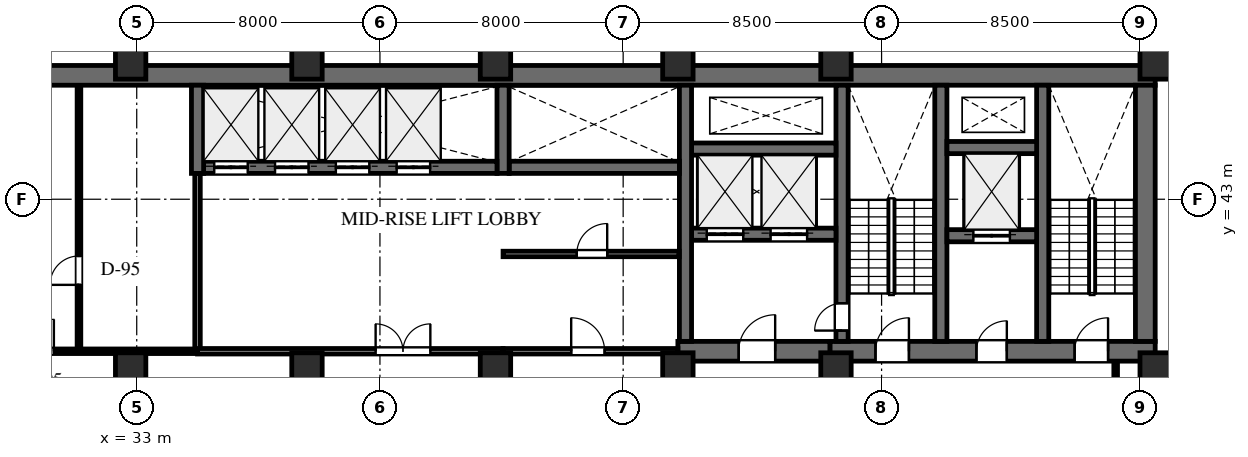
"""IFC4 building model, lengths in metres.
Left out: names, types, materials, properties, quantities, classifications, styles, units other than length and angle.
Written with IfcOpenShell. Run it as: python <this file> out.ifc"""

import sys

from ifc_helpers import new_model, si_unit, direction, frame, frame_2d, origin, origin_2d, place, context, subcontext, project, spatial, rectangle, extrude, element, fill, save


model = new_model("IFC4")
c1 = context("Model", 3, precision=1e-05, world=origin(), true_north=direction((0.0, 1.0)))
c2 = subcontext(c1, "Body", "Model", "MODEL_VIEW")
j1 = project(units=[si_unit("LENGTHUNIT", "METRE"), si_unit("PLANEANGLEUNIT", "RADIAN")], contexts=[c1])
p1 = place(None, origin())
s1 = spatial("IfcSite", under=j1, at=p1, CompositionType="ELEMENT")
p2 = place(p1, origin())
s2 = spatial("IfcBuilding", under=s1, at=p2, CompositionType="ELEMENT")
p3 = place(p2, frame((0.0, 0.0, 104.0)))
s3 = spatial("IfcBuildingStorey", under=s2, at=p3, CompositionType="ELEMENT", Elevation=104.0)
p4 = place(p3, frame((22.9, 47.075, 0.0), z_axis=(0.0, 0.0, 1.0), x_axis=(1.0, 0.0, 0.0)))
e1 = element("IfcWall", 1, at=p4, inside=s3, PredefinedType="SHEAR", context=c2, shape_type="SweptSolid", body=[
    extrude(rectangle(XDim=43.6, YDim=0.65, at=frame_2d((21.8, 0.0))), origin(), (0.0, 0.0, 1.0), 4.0),
])
p5 = place(p3, frame((55.8, 38.0, 0.0), z_axis=(0.0, 0.0, 1.0), x_axis=(1.0, 0.0, 0.0)))
e2 = element("IfcWall", 2, at=p5, inside=s3, PredefinedType="SHEAR", context=c2, shape_type="SweptSolid", body=[
    extrude(rectangle(XDim=10.7, YDim=0.65, at=frame_2d((5.35, 0.0))), origin(), (0.0, 0.0, 1.0), 4.0),
])
p6 = place(p5, frame((1.5, 0.0, 0.0)))
e3 = element("IfcOpeningElement", 3, at=p6, cuts=e2, PredefinedType="OPENING", context=c2, shape_type="SweptSolid", body=[
    extrude(rectangle(XDim=1.1, YDim=2.2, at=frame_2d((0.55, 1.1))), frame((0.0, 0.335, 0.0), z_axis=(0.0, -1.0, 0.0), x_axis=(1.0, 0.0, 0.0)), (0.0, 0.0, 1.0), 0.67),
])
p7 = place(p5, frame((4.82, 0.0, 0.0)))
e4 = element("IfcOpeningElement", 4, at=p7, cuts=e2, PredefinedType="OPENING", context=c2, shape_type="SweptSolid", body=[
    extrude(rectangle(XDim=1.0, YDim=2.15, at=frame_2d((0.5, 1.075))), frame((0.0, 0.335, 0.0), z_axis=(0.0, -1.0, 0.0), x_axis=(1.0, 0.0, 0.0)), (0.0, 0.0, 1.0), 0.67),
])
p8 = place(p5, frame((8.05, 0.0, 0.0)))
e5 = element("IfcOpeningElement", 5, at=p8, cuts=e2, PredefinedType="OPENING", context=c2, shape_type="SweptSolid", body=[
    extrude(rectangle(XDim=1.1, YDim=2.2, at=frame_2d((0.55, 1.1))), frame((0.0, 0.335, 0.0), z_axis=(0.0, -1.0, 0.0), x_axis=(1.0, 0.0, 0.0)), (0.0, 0.0, 1.0), 0.67),
])
p9 = place(p3, frame((66.175, 38.325, 0.0), z_axis=(0.0, 0.0, 1.0), x_axis=(0.0, 1.0, 0.0)))
e6 = element("IfcWall", 6, at=p9, inside=s3, PredefinedType="SHEAR", context=c2, shape_type="SweptSolid", body=[
    extrude(rectangle(XDim=8.425, YDim=0.65, at=frame_2d((4.212, 0.0))), origin(), (0.0, 0.0, 1.0), 4.0),
])
for number, where, z_axis, x_axis in (
    (7, (62.8, 38.325, 0.0), (0.0, 0.0, 1.0), (0.0, 1.0, 0.0)),
    (8, (59.45, 38.325, 0.0), (0.0, 0.0, 1.0), (0.0, 1.0, 0.0)),
):
    element("IfcWall", number, at=place(p3, frame(where, z_axis=z_axis, x_axis=x_axis)), inside=s3, PredefinedType="SHEAR", context=c2, shape_type="SweptSolid", body=[
        extrude(rectangle(XDim=8.425, YDim=0.4, at=frame_2d((4.212, 0.0))), origin(), (0.0, 0.0, 1.0), 4.0),
    ])
p10 = place(p3, frame((56.2, 38.325, 0.0), z_axis=(0.0, 0.0, 1.0), x_axis=(0.0, 1.0, 0.0)))
e9 = element("IfcWall", 9, at=p10, inside=s3, PredefinedType="SHEAR", context=c2, shape_type="SweptSolid", body=[
    extrude(rectangle(XDim=8.425, YDim=0.4, at=frame_2d((4.212, 0.0))), origin(), (0.0, 0.0, 1.0), 4.0),
])
p11 = place(p10, frame((0.355, 0.0, 0.0)))
e10 = element("IfcOpeningElement", 10, at=p11, cuts=e9, PredefinedType="OPENING", context=c2, shape_type="SweptSolid", body=[
    extrude(rectangle(XDim=0.9, YDim=2.15, at=frame_2d((0.45, 1.075))), frame((0.0, 0.21, 0.0), z_axis=(0.0, -1.0, 0.0), x_axis=(1.0, 0.0, 0.0)), (0.0, 0.0, 1.0), 0.42),
])
p12 = place(p3, frame((59.65, 41.8, 0.0), z_axis=(0.0, 0.0, 1.0), x_axis=(1.0, 0.0, 0.0)))
e11 = element("IfcWall", 11, at=p12, inside=s3, PredefinedType="SHEAR", context=c2, shape_type="SweptSolid", body=[
    extrude(rectangle(XDim=2.95, YDim=0.4, at=frame_2d((1.475, 0.0))), origin(), (0.0, 0.0, 1.0), 4.0),
])
p13 = place(p12, frame((0.87, 0.0, 0.0)))
e12 = element("IfcOpeningElement", 12, at=p13, cuts=e11, PredefinedType="OPENING", context=c2, shape_type="SweptSolid", body=[
    extrude(rectangle(XDim=1.2, YDim=2.2, at=frame_2d((0.6, 1.1))), frame((0.0, 0.21, 0.0), z_axis=(0.0, -1.0, 0.0), x_axis=(1.0, 0.0, 0.0)), (0.0, 0.0, 1.0), 0.42),
])
p14 = place(p3, frame((59.65, 44.7, 0.0), z_axis=(0.0, 0.0, 1.0), x_axis=(1.0, 0.0, 0.0)))
e13 = element("IfcWall", 13, at=p14, inside=s3, PredefinedType="SHEAR", context=c2, shape_type="SweptSolid", body=[
    extrude(rectangle(XDim=2.95, YDim=0.4, at=frame_2d((1.475, 0.0))), origin(), (0.0, 0.0, 1.0), 4.0),
])
p15 = place(p3, frame((50.8, 38.0, 0.0), z_axis=(0.0, 0.0, 1.0), x_axis=(1.0, 0.0, 0.0)))
e14 = element("IfcWall", 14, at=p15, inside=s3, PredefinedType="SHEAR", context=c2, shape_type="SweptSolid", body=[
    extrude(rectangle(XDim=5.0, YDim=0.65, at=frame_2d((2.5, 0.0))), origin(), (0.0, 0.0, 1.0), 4.0),
])
p16 = place(p15, frame((2.0, 0.0, 0.0)))
e15 = element("IfcOpeningElement", 15, at=p16, cuts=e14, PredefinedType="OPENING", context=c2, shape_type="SweptSolid", body=[
    extrude(rectangle(XDim=1.2, YDim=2.2, at=frame_2d((0.6, 1.1))), frame((0.0, 0.335, 0.0), z_axis=(0.0, -1.0, 0.0), x_axis=(1.0, 0.0, 0.0)), (0.0, 0.0, 1.0), 0.67),
])
p17 = place(p3, frame((51.25, 41.85, 0.0), z_axis=(0.0, 0.0, 1.0), x_axis=(1.0, 0.0, 0.0)))
e16 = element("IfcWall", 16, at=p17, inside=s3, PredefinedType="SHEAR", context=c2, shape_type="SweptSolid", body=[
    extrude(rectangle(XDim=4.75, YDim=0.4, at=frame_2d((2.375, 0.0))), origin(), (0.0, 0.0, 1.0), 4.0),
])
p18 = place(p17, frame((0.5, 0.0, 0.0)))
e17 = element("IfcOpeningElement", 17, at=p18, cuts=e16, PredefinedType="OPENING", context=c2, shape_type="SweptSolid", body=[
    extrude(rectangle(XDim=1.2, YDim=2.2, at=frame_2d((0.6, 1.1))), frame((0.0, 0.21, 0.0), z_axis=(0.0, -1.0, 0.0), x_axis=(1.0, 0.0, 0.0)), (0.0, 0.0, 1.0), 0.42),
])
p19 = place(p17, frame((2.6, 0.0, 0.0)))
e18 = element("IfcOpeningElement", 18, at=p19, cuts=e16, PredefinedType="OPENING", context=c2, shape_type="SweptSolid", body=[
    extrude(rectangle(XDim=1.2, YDim=2.2, at=frame_2d((0.6, 1.1))), frame((0.0, 0.21, 0.0), z_axis=(0.0, -1.0, 0.0), x_axis=(1.0, 0.0, 0.0)), (0.0, 0.0, 1.0), 0.42),
])
p20 = place(p3, frame((51.25, 44.65, 0.0), z_axis=(0.0, 0.0, 1.0), x_axis=(1.0, 0.0, 0.0)))
e19 = element("IfcWall", 19, at=p20, inside=s3, PredefinedType="SHEAR", context=c2, shape_type="SweptSolid", body=[
    extrude(rectangle(XDim=4.75, YDim=0.4, at=frame_2d((2.375, 0.0))), origin(), (0.0, 0.0, 1.0), 4.0),
])
p21 = place(p3, frame((51.05, 38.325, 0.0), z_axis=(0.0, 0.0, 1.0), x_axis=(0.0, 1.0, 0.0)))
e20 = element("IfcWall", 20, at=p21, inside=s3, PredefinedType="SHEAR", context=c2, shape_type="SweptSolid", body=[
    extrude(rectangle(XDim=8.425, YDim=0.4, at=frame_2d((4.212, 0.0))), origin(), (0.0, 0.0, 1.0), 4.0),
])
p22 = place(p3, frame((45.25, 44.05, 0.0), z_axis=(0.0, 0.0, 1.0), x_axis=(1.0, 0.0, 0.0)))
e21 = element("IfcWall", 21, at=p22, inside=s3, PredefinedType="SHEAR", context=c2, shape_type="SweptSolid", body=[
    extrude(rectangle(XDim=5.6, YDim=0.4, at=frame_2d((2.8, 0.0))), origin(), (0.0, 0.0, 1.0), 4.0),
])
p23 = place(p3, frame((45.05, 43.85, 0.0), z_axis=(0.0, 0.0, 1.0), x_axis=(0.0, 1.0, 0.0)))
e22 = element("IfcWall", 22, at=p23, inside=s3, PredefinedType="SHEAR", context=c2, shape_type="SweptSolid", body=[
    extrude(rectangle(XDim=2.9, YDim=0.4, at=frame_2d((1.45, 0.0))), origin(), (0.0, 0.0, 1.0), 4.0),
])
p24 = place(p3, frame((35.2, 44.05, 0.0), z_axis=(0.0, 0.0, 1.0), x_axis=(1.0, 0.0, 0.0)))
e23 = element("IfcWall", 23, at=p24, inside=s3, PredefinedType="SHEAR", context=c2, shape_type="SweptSolid", body=[
    extrude(rectangle(XDim=9.65, YDim=0.4, at=frame_2d((4.825, 0.0))), origin(), (0.0, 0.0, 1.0), 4.0),
])
p25 = place(p24, frame((0.35, 0.0, 0.0)))
e24 = element("IfcOpeningElement", 24, at=p25, cuts=e23, PredefinedType="OPENING", context=c2, shape_type="SweptSolid", body=[
    extrude(rectangle(XDim=1.1, YDim=2.2, at=frame_2d((0.55, 1.1))), frame((0.0, 0.21, 0.0), z_axis=(0.0, -1.0, 0.0), x_axis=(1.0, 0.0, 0.0)), (0.0, 0.0, 1.0), 0.42),
])
p26 = place(p24, frame((2.35, 0.0, 0.0)))
e25 = element("IfcOpeningElement", 25, at=p26, cuts=e23, PredefinedType="OPENING", context=c2, shape_type="SweptSolid", body=[
    extrude(rectangle(XDim=1.1, YDim=2.2, at=frame_2d((0.55, 1.1))), frame((0.0, 0.21, 0.0), z_axis=(0.0, -1.0, 0.0), x_axis=(1.0, 0.0, 0.0)), (0.0, 0.0, 1.0), 0.42),
])
p27 = place(p24, frame((4.35, 0.0, 0.0)))
e26 = element("IfcOpeningElement", 26, at=p27, cuts=e23, PredefinedType="OPENING", context=c2, shape_type="SweptSolid", body=[
    extrude(rectangle(XDim=1.1, YDim=2.2, at=frame_2d((0.55, 1.1))), frame((0.0, 0.21, 0.0), z_axis=(0.0, -1.0, 0.0), x_axis=(1.0, 0.0, 0.0)), (0.0, 0.0, 1.0), 0.42),
])
p28 = place(p24, frame((6.35, 0.0, 0.0)))
e27 = element("IfcOpeningElement", 27, at=p28, cuts=e23, PredefinedType="OPENING", context=c2, shape_type="SweptSolid", body=[
    extrude(rectangle(XDim=1.1, YDim=2.2, at=frame_2d((0.55, 1.1))), frame((0.0, 0.21, 0.0), z_axis=(0.0, -1.0, 0.0), x_axis=(1.0, 0.0, 0.0)), (0.0, 0.0, 1.0), 0.42),
])
p29 = place(p3, frame((35.0, 43.85, 0.0), z_axis=(0.0, 0.0, 1.0), x_axis=(0.0, 1.0, 0.0)))
e28 = element("IfcWall", 28, at=p29, inside=s3, PredefinedType="SHEAR", context=c2, shape_type="SweptSolid", body=[
    extrude(rectangle(XDim=2.9, YDim=0.4, at=frame_2d((1.45, 0.0))), origin(), (0.0, 0.0, 1.0), 4.0),
])
for number, where, z_axis, x_axis in (
    (29, (66.5, 47.55, 0.0), (0.0, 0.0, 1.0), (1.0, 0.0, 0.0)),
    (30, (56.0, 47.55, 0.0), (0.0, 0.0, 1.0), (1.0, 0.0, 0.0)),
    (31, (66.5, 37.35, 0.0), (0.0, 0.0, 1.0), (1.0, 0.0, 0.0)),
    (32, (56.0, 37.35, 0.0), (0.0, 0.0, 1.0), (1.0, 0.0, 0.0)),
    (33, (50.8, 47.55, 0.0), (0.0, 0.0, 1.0), (1.0, 0.0, 0.0)),
    (34, (50.8, 37.35, 0.0), (0.0, 0.0, 1.0), (1.0, 0.0, 0.0)),
    (35, (44.8, 37.35, 0.0), (0.0, 0.0, 1.0), (1.0, 0.0, 0.0)),
    (36, (44.8, 47.55, 0.0), (0.0, 0.0, 1.0), (1.0, 0.0, 0.0)),
    (37, (38.6, 37.35, 0.0), (0.0, 0.0, 1.0), (1.0, 0.0, 0.0)),
    (38, (38.6, 47.55, 0.0), (0.0, 0.0, 1.0), (1.0, 0.0, 0.0)),
    (39, (32.8, 37.35, 0.0), (0.0, 0.0, 1.0), (1.0, 0.0, 0.0)),
    (40, (32.8, 47.55, 0.0), (0.0, 0.0, 1.0), (1.0, 0.0, 0.0)),
):
    element("IfcColumn", number, at=place(p3, frame(where, z_axis=z_axis, x_axis=x_axis)), inside=s3, PredefinedType="COLUMN", context=c2, shape_type="SweptSolid", body=[
        extrude(rectangle(XDim=1.0, YDim=1.2, at=origin_2d()), origin(), (0.0, 0.0, 1.0), 4.0),
    ])
p30 = place(p3, frame((68.375, 37.8, 0.0), z_axis=(0.0, 0.0, 1.0), x_axis=(-0.13917001236, -0.990268502811, 0.0)))
e41 = element("IfcWall", 41, at=p30, inside=s3, PredefinedType="STANDARD", context=c2, shape_type="SweptSolid", body=[
    extrude(rectangle(XDim=29.549, YDim=0.28, at=frame_2d((14.774, 0.0))), origin(), (0.0, 0.0, 1.0), 3.75),
])
p31 = place(p30, frame((7.581, 0.0, 0.0)))
e42 = element("IfcOpeningElement", 42, at=p31, cuts=e41, PredefinedType="OPENING", context=c2, shape_type="SweptSolid", body=[
    extrude(rectangle(XDim=1.0, YDim=2.15, at=frame_2d((0.5, 1.075))), frame((0.0, 0.15, 0.0), z_axis=(0.0, -1.0, 0.0), x_axis=(1.0, 0.0, 0.0)), (0.0, 0.0, 1.0), 0.3),
])
p32 = place(p30, frame((3.611, 0.0, 0.65)))
e43 = element("IfcOpeningElement", 43, at=p32, cuts=e41, PredefinedType="OPENING", context=c2, shape_type="SweptSolid", body=[
    extrude(rectangle(XDim=1.8, YDim=2.1, at=frame_2d((0.9, 1.05))), frame((0.0, 0.15, 0.0), z_axis=(0.0, -1.0, 0.0), x_axis=(1.0, 0.0, 0.0)), (0.0, 0.0, 1.0), 0.3),
])
p33 = place(p30, frame((17.896, 0.0, 0.65)))
e44 = element("IfcOpeningElement", 44, at=p33, cuts=e41, PredefinedType="OPENING", context=c2, shape_type="SweptSolid", body=[
    extrude(rectangle(XDim=1.8, YDim=2.1, at=frame_2d((0.9, 1.05))), frame((0.0, 0.15, 0.0), z_axis=(0.0, -1.0, 0.0), x_axis=(1.0, 0.0, 0.0)), (0.0, 0.0, 1.0), 0.3),
])
p34 = place(p3, frame((45.05, 38.0, 0.0), z_axis=(0.0, 0.0, 1.0), x_axis=(1.0, 0.0, 0.0)))
e45 = element("IfcWall", 45, at=p34, inside=s3, PredefinedType="STANDARD", context=c2, shape_type="SweptSolid", body=[
    extrude(rectangle(XDim=5.75, YDim=0.18, at=frame_2d((2.875, 0.0))), origin(), (0.0, 0.0, 1.0), 2.894),
])
p35 = place(p34, frame((2.24, 0.0, 0.0)))
e46 = element("IfcOpeningElement", 46, at=p35, cuts=e45, PredefinedType="OPENING", context=c2, shape_type="SweptSolid", body=[
    extrude(rectangle(XDim=1.1, YDim=2.2, at=frame_2d((0.55, 1.1))), frame((0.0, 0.1, 0.0), z_axis=(0.0, -1.0, 0.0), x_axis=(1.0, 0.0, 0.0)), (0.0, 0.0, 1.0), 0.2),
])
p36 = place(p3, frame((45.05, 41.2, 0.0), z_axis=(0.0, 0.0, 1.0), x_axis=(1.0, 0.0, 0.0)))
e47 = element("IfcWall", 47, at=p36, inside=s3, PredefinedType="STANDARD", context=c2, shape_type="SweptSolid", body=[
    extrude(rectangle(XDim=5.792, YDim=0.18, at=frame_2d((2.896, 0.0))), origin(), (0.0, 0.0, 1.0), 2.894),
])
p37 = place(p36, frame((2.425, 0.0, 0.0)))
e48 = element("IfcOpeningElement", 48, at=p37, cuts=e47, PredefinedType="OPENING", context=c2, shape_type="SweptSolid", body=[
    extrude(rectangle(XDim=1.0, YDim=2.15, at=frame_2d((0.5, 1.075))), frame((0.0, 0.1, 0.0), z_axis=(0.0, -1.0, 0.0), x_axis=(1.0, 0.0, 0.0)), (0.0, 0.0, 1.0), 0.2),
])
p38 = place(p3, frame((27.05, 38.0, 0.0), z_axis=(0.0, 0.0, 1.0), x_axis=(1.0, 0.0, 0.0)))
e49 = element("IfcWall", 49, at=p38, inside=s3, PredefinedType="PARTITIONING", context=c2, shape_type="SweptSolid", body=[
    extrude(rectangle(XDim=7.95, YDim=0.15, at=frame_2d((3.975, 0.0))), origin(), (0.0, 0.0, 1.0), 2.894),
])
p39 = place(p38, frame((2.175, 0.0, 0.0)))
e50 = element("IfcOpeningElement", 50, at=p39, cuts=e49, PredefinedType="OPENING", context=c2, shape_type="SweptSolid", body=[
    extrude(rectangle(XDim=1.05, YDim=2.2, at=frame_2d((0.525, 1.1))), frame((0.0, 0.085, 0.0), z_axis=(0.0, -1.0, 0.0), x_axis=(1.0, 0.0, 0.0)), (0.0, 0.0, 1.0), 0.17),
])
p40 = place(p3, frame((35.0, 38.0, 0.0), z_axis=(0.0, 0.0, 1.0), x_axis=(0.0, 1.0, 0.0)))
e51 = element("IfcWall", 51, at=p40, inside=s3, PredefinedType="STANDARD", context=c2, shape_type="SweptSolid", body=[
    extrude(rectangle(XDim=5.85, YDim=0.18, at=frame_2d((2.925, 0.0))), origin(), (0.0, 0.0, 1.0), 3.75),
])
p41 = place(p3, frame((31.1, 38.068, 0.0), z_axis=(0.0, 0.0, 1.0), x_axis=(0.0, 1.0, 0.0)))
e52 = element("IfcWall", 52, at=p41, inside=s3, PredefinedType="PARTITIONING", context=c2, shape_type="SweptSolid", body=[
    extrude(rectangle(XDim=8.674, YDim=0.12, at=frame_2d((4.337, 0.0))), origin(), (0.0, 0.0, 1.0), 3.75),
])
p42 = place(p41, frame((2.116, 0.0, 0.0)))
e53 = element("IfcOpeningElement", 53, at=p42, cuts=e52, PredefinedType="OPENING", context=c2, shape_type="SweptSolid", body=[
    extrude(rectangle(XDim=0.95, YDim=2.15, at=frame_2d((0.475, 1.075))), frame((0.0, 0.07, 0.0), z_axis=(0.0, -1.0, 0.0), x_axis=(1.0, 0.0, 0.0)), (0.0, 0.0, 1.0), 0.14),
])
p43 = place(p3, frame((35.0, 38.0, 0.0), z_axis=(0.0, 0.0, 1.0), x_axis=(1.0, 0.0, 0.0)))
e54 = element("IfcWall", 54, at=p43, inside=s3, PredefinedType="STANDARD", context=c2, shape_type="SweptSolid", body=[
    extrude(rectangle(XDim=10.05, YDim=0.18, at=frame_2d((5.025, 0.0))), origin(), (0.0, 0.0, 1.0), 2.894),
])
p44 = place(p43, frame((5.858, 0.0, 0.0)))
e55 = element("IfcOpeningElement", 55, at=p44, cuts=e54, PredefinedType="OPENING", context=c2, shape_type="SweptSolid", body=[
    extrude(rectangle(XDim=1.8, YDim=2.2, at=frame_2d((0.9, 1.1))), frame((0.0, 0.1, 0.0), z_axis=(0.0, -1.0, 0.0), x_axis=(1.0, 0.0, 0.0)), (0.0, 0.0, 1.0), 0.2),
])
p45 = place(p3, frame((65.2, 34.4, 0.0), z_axis=(0.0, 0.0, 1.0), x_axis=(0.0, 1.0, 0.0)))
e56 = element("IfcWall", 56, at=p45, inside=s3, PredefinedType="PARTITIONING", context=c2, shape_type="SweptSolid", body=[
    extrude(rectangle(XDim=3.267, YDim=0.12, at=frame_2d((1.634, 0.0))), origin(), (0.0, 0.0, 1.0), 2.894),
])
p46 = place(p6, origin())
e57 = element("IfcDoor", 57, at=p46, inside=s3, OperationType="SINGLE_SWING_RIGHT", PredefinedType="DOOR", context=c2, shape_type="SweptSolid", body=[
    extrude(rectangle(XDim=1.1, YDim=2.2, at=frame_2d((0.55, 1.1))), frame((0.0, 0.025, 0.0), z_axis=(0.0, -1.0, 0.0), x_axis=(1.0, 0.0, 0.0)), (0.0, 0.0, 1.0), 0.05),
])
fill(e3, e57)
p47 = place(p7, origin())
e58 = element("IfcDoor", 58, at=p47, inside=s3, OperationType="SINGLE_SWING_RIGHT", PredefinedType="DOOR", context=c2, shape_type="SweptSolid", body=[
    extrude(rectangle(XDim=1.0, YDim=2.15, at=frame_2d((0.5, 1.075))), frame((0.0, 0.025, 0.0), z_axis=(0.0, -1.0, 0.0), x_axis=(1.0, 0.0, 0.0)), (0.0, 0.0, 1.0), 0.05),
])
fill(e4, e58)
p48 = place(p8, origin())
e59 = element("IfcDoor", 59, at=p48, inside=s3, OperationType="SINGLE_SWING_RIGHT", PredefinedType="DOOR", context=c2, shape_type="SweptSolid", body=[
    extrude(rectangle(XDim=1.1, YDim=2.2, at=frame_2d((0.55, 1.1))), frame((0.0, 0.025, 0.0), z_axis=(0.0, -1.0, 0.0), x_axis=(1.0, 0.0, 0.0)), (0.0, 0.0, 1.0), 0.05),
])
fill(e5, e59)
p49 = place(p16, origin())
e60 = element("IfcDoor", 60, at=p49, inside=s3, OperationType="SINGLE_SWING_RIGHT", PredefinedType="DOOR", context=c2, shape_type="SweptSolid", body=[
    extrude(rectangle(XDim=1.2, YDim=2.2, at=frame_2d((0.6, 1.1))), frame((0.0, 0.025, 0.0), z_axis=(0.0, -1.0, 0.0), x_axis=(1.0, 0.0, 0.0)), (0.0, 0.0, 1.0), 0.05),
])
fill(e15, e60)
p50 = place(p11, origin())
e61 = element("IfcDoor", 61, at=p50, inside=s3, OperationType="SINGLE_SWING_LEFT", PredefinedType="DOOR", context=c2, shape_type="SweptSolid", body=[
    extrude(rectangle(XDim=0.9, YDim=2.15, at=frame_2d((0.45, 1.075))), frame((0.0, 0.025, 0.0), z_axis=(0.0, -1.0, 0.0), x_axis=(1.0, 0.0, 0.0)), (0.0, 0.0, 1.0), 0.05),
])
fill(e10, e61)
p51 = place(p25, origin())
e62 = element("IfcDoor", 62, at=p51, inside=s3, OperationType="DOUBLE_DOOR_SLIDING", PredefinedType="DOOR", context=c2, shape_type="SweptSolid", body=[
    extrude(rectangle(XDim=1.1, YDim=2.2, at=frame_2d((0.55, 1.1))), frame((0.0, 0.025, 0.0), z_axis=(0.0, -1.0, 0.0), x_axis=(1.0, 0.0, 0.0)), (0.0, 0.0, 1.0), 0.05),
])
fill(e24, e62)
p52 = place(p26, origin())
e63 = element("IfcDoor", 63, at=p52, inside=s3, OperationType="DOUBLE_DOOR_SLIDING", PredefinedType="DOOR", context=c2, shape_type="SweptSolid", body=[
    extrude(rectangle(XDim=1.1, YDim=2.2, at=frame_2d((0.55, 1.1))), frame((0.0, 0.025, 0.0), z_axis=(0.0, -1.0, 0.0), x_axis=(1.0, 0.0, 0.0)), (0.0, 0.0, 1.0), 0.05),
])
fill(e25, e63)
p53 = place(p27, origin())
e64 = element("IfcDoor", 64, at=p53, inside=s3, OperationType="DOUBLE_DOOR_SLIDING", PredefinedType="DOOR", context=c2, shape_type="SweptSolid", body=[
    extrude(rectangle(XDim=1.1, YDim=2.2, at=frame_2d((0.55, 1.1))), frame((0.0, 0.025, 0.0), z_axis=(0.0, -1.0, 0.0), x_axis=(1.0, 0.0, 0.0)), (0.0, 0.0, 1.0), 0.05),
])
fill(e26, e64)
p54 = place(p28, origin())
e65 = element("IfcDoor", 65, at=p54, inside=s3, OperationType="DOUBLE_DOOR_SLIDING", PredefinedType="DOOR", context=c2, shape_type="SweptSolid", body=[
    extrude(rectangle(XDim=1.1, YDim=2.2, at=frame_2d((0.55, 1.1))), frame((0.0, 0.025, 0.0), z_axis=(0.0, -1.0, 0.0), x_axis=(1.0, 0.0, 0.0)), (0.0, 0.0, 1.0), 0.05),
])
fill(e27, e65)
p55 = place(p18, origin())
e66 = element("IfcDoor", 66, at=p55, inside=s3, OperationType="DOUBLE_DOOR_SLIDING", PredefinedType="DOOR", context=c2, shape_type="SweptSolid", body=[
    extrude(rectangle(XDim=1.2, YDim=2.2, at=frame_2d((0.6, 1.1))), frame((0.0, 0.025, 0.0), z_axis=(0.0, -1.0, 0.0), x_axis=(1.0, 0.0, 0.0)), (0.0, 0.0, 1.0), 0.05),
])
fill(e17, e66)
p56 = place(p19, origin())
e67 = element("IfcDoor", 67, at=p56, inside=s3, OperationType="DOUBLE_DOOR_SLIDING", PredefinedType="DOOR", context=c2, shape_type="SweptSolid", body=[
    extrude(rectangle(XDim=1.2, YDim=2.2, at=frame_2d((0.6, 1.1))), frame((0.0, 0.025, 0.0), z_axis=(0.0, -1.0, 0.0), x_axis=(1.0, 0.0, 0.0)), (0.0, 0.0, 1.0), 0.05),
])
fill(e18, e67)
p57 = place(p13, origin())
e68 = element("IfcDoor", 68, at=p57, inside=s3, OperationType="DOUBLE_DOOR_SLIDING", PredefinedType="DOOR", context=c2, shape_type="SweptSolid", body=[
    extrude(rectangle(XDim=1.2, YDim=2.2, at=frame_2d((0.6, 1.1))), frame((0.0, 0.025, 0.0), z_axis=(0.0, -1.0, 0.0), x_axis=(1.0, 0.0, 0.0)), (0.0, 0.0, 1.0), 0.05),
])
fill(e12, e68)
p58 = place(p37, origin())
e69 = element("IfcDoor", 69, at=p58, inside=s3, OperationType="SINGLE_SWING_RIGHT", PredefinedType="DOOR", context=c2, shape_type="SweptSolid", body=[
    extrude(rectangle(XDim=1.0, YDim=2.15, at=frame_2d((0.5, 1.075))), frame((0.0, 0.025, 0.0), z_axis=(0.0, -1.0, 0.0), x_axis=(1.0, 0.0, 0.0)), (0.0, 0.0, 1.0), 0.05),
])
fill(e48, e69)
p59 = place(p35, origin())
e70 = element("IfcDoor", 70, at=p59, inside=s3, OperationType="SINGLE_SWING_LEFT", PredefinedType="DOOR", context=c2, shape_type="SweptSolid", body=[
    extrude(rectangle(XDim=1.1, YDim=2.2, at=frame_2d((0.55, 1.1))), frame((0.0, 0.025, 0.0), z_axis=(0.0, -1.0, 0.0), x_axis=(1.0, 0.0, 0.0)), (0.0, 0.0, 1.0), 0.05),
])
fill(e46, e70)
p60 = place(p39, origin())
e71 = element("IfcDoor", 71, at=p60, inside=s3, OperationType="SINGLE_SWING_RIGHT", PredefinedType="DOOR", context=c2, shape_type="SweptSolid", body=[
    extrude(rectangle(XDim=1.05, YDim=2.2, at=frame_2d((0.525, 1.1))), frame((0.0, 0.025, 0.0), z_axis=(0.0, -1.0, 0.0), x_axis=(1.0, 0.0, 0.0)), (0.0, 0.0, 1.0), 0.05),
])
fill(e50, e71)
p61 = place(p42, origin())
e72 = element("IfcDoor", 72, at=p61, inside=s3, OperationType="SINGLE_SWING_LEFT", PredefinedType="DOOR", context=c2, shape_type="SweptSolid", body=[
    extrude(rectangle(XDim=0.95, YDim=2.15, at=frame_2d((0.475, 1.075))), frame((0.0, 0.025, 0.0), z_axis=(0.0, -1.0, 0.0), x_axis=(1.0, 0.0, 0.0)), (0.0, 0.0, 1.0), 0.05),
])
fill(e53, e72)
p62 = place(p44, origin())
e73 = element("IfcDoor", 73, at=p62, inside=s3, OperationType="DOUBLE_DOOR_SINGLE_SWING", PredefinedType="DOOR", context=c2, shape_type="SweptSolid", body=[
    extrude(rectangle(XDim=1.8, YDim=2.2, at=frame_2d((0.9, 1.1))), frame((0.0, 0.025, 0.0), z_axis=(0.0, -1.0, 0.0), x_axis=(1.0, 0.0, 0.0)), (0.0, 0.0, 1.0), 0.05),
])
fill(e55, e73)
save(model, sys.argv[1])
